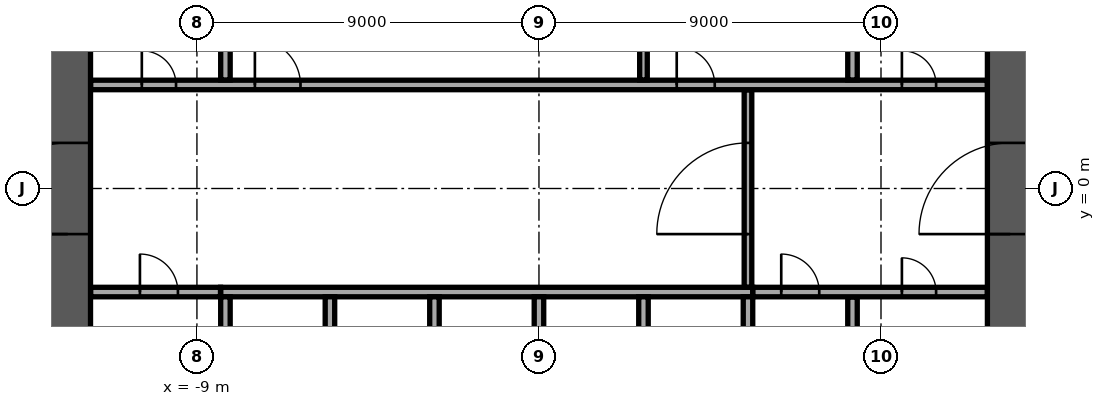
"""IFC4 building model, lengths in metres.
Left out: names, types, materials, properties, quantities, classifications, styles, units other than length and angle.
Written with IfcOpenShell. Run it as: python <this file> out.ifc"""

import sys

from ifc_helpers import new_model, si_unit, direction, frame, frame_2d, origin, place, context, subcontext, project, spatial, rectangle, extrude, element, fill, save


model = new_model("IFC4")
c1 = context("Model", 3, precision=1e-05, world=origin(), true_north=direction((0.0, 1.0)))
c2 = subcontext(c1, "Body", "Model", "MODEL_VIEW")
j1 = project(units=[si_unit("LENGTHUNIT", "METRE"), si_unit("PLANEANGLEUNIT", "RADIAN")], contexts=[c1])
p1 = place(None, origin())
s1 = spatial("IfcSite", under=j1, at=p1, CompositionType="ELEMENT")
p2 = place(p1, origin())
s2 = spatial("IfcBuilding", under=s1, at=p2, CompositionType="ELEMENT")
p3 = place(p2, frame((0.0, 0.0, 18.0)))
s3 = spatial("IfcBuildingStorey", under=s2, at=p3, CompositionType="ELEMENT", Elevation=18.0)
p4 = place(p3, frame((12.4, -11.8, 0.0), z_axis=(0.0, 0.0, 1.0), x_axis=(0.0, 1.0, 0.0)))
e1 = element("IfcWall", 1, at=p4, inside=s3, PredefinedType="SHEAR", context=c2, shape_type="SweptSolid", body=[
    extrude(rectangle(XDim=23.6, YDim=1.2, at=frame_2d((11.8, 0.0))), origin(), (0.0, 0.0, 1.0), 4.05),
])
p5 = place(p4, frame((10.6, 0.0, 0.0)))
e2 = element("IfcOpeningElement", 2, at=p5, cuts=e1, PredefinedType="OPENING", context=c2, shape_type="SweptSolid", body=[
    extrude(rectangle(XDim=2.4, YDim=2.4, at=frame_2d((1.2, 1.2))), frame((0.0, 0.61, 0.0), z_axis=(0.0, -1.0, 0.0), x_axis=(1.0, 0.0, 0.0)), (0.0, 0.0, 1.0), 1.22),
])
p6 = place(p3, frame((-12.4, -11.8, 0.0), z_axis=(0.0, 0.0, 1.0), x_axis=(0.0, 1.0, 0.0)))
e3 = element("IfcWall", 3, at=p6, inside=s3, PredefinedType="SHEAR", context=c2, shape_type="SweptSolid", body=[
    extrude(rectangle(XDim=23.6, YDim=1.2, at=frame_2d((11.8, 0.0))), origin(), (0.0, 0.0, 1.0), 4.05),
])
p7 = place(p6, frame((10.6, 0.0, 0.0)))
e4 = element("IfcOpeningElement", 4, at=p7, cuts=e3, PredefinedType="OPENING", context=c2, shape_type="SweptSolid", body=[
    extrude(rectangle(XDim=2.4, YDim=2.4, at=frame_2d((1.2, 1.2))), frame((0.0, 0.61, 0.0), z_axis=(0.0, -1.0, 0.0), x_axis=(1.0, 0.0, 0.0)), (0.0, 0.0, 1.0), 1.22),
])
p8 = place(p3, frame((-8.375, -2.725, 0.0), z_axis=(0.0, 0.0, 1.0), x_axis=(1.0, 0.0, 0.0)))
e5 = element("IfcWall", 5, at=p8, inside=s3, PredefinedType="SOLIDWALL", context=c2, shape_type="SweptSolid", body=[
    extrude(rectangle(XDim=14.0, YDim=0.25, at=frame_2d((7.0, 0.0))), origin(), (0.0, 0.0, 1.0), 4.05),
])
for number, where, z_axis, x_axis in (
    (6, (-8.25, -5.55, 0.0), (0.0, 0.0, 1.0), (0.0, 1.0, 0.0)),
    (7, (-5.5, -5.55, 0.0), (0.0, 0.0, 1.0), (0.0, 1.0, 0.0)),
    (8, (-2.75, -5.55, 0.0), (0.0, 0.0, 1.0), (0.0, 1.0, 0.0)),
    (9, (0.0, -5.55, 0.0), (0.0, 0.0, 1.0), (0.0, 1.0, 0.0)),
    (10, (2.75, -5.55, 0.0), (0.0, 0.0, 1.0), (0.0, 1.0, 0.0)),
    (11, (5.5, -5.55, 0.0), (0.0, 0.0, 1.0), (0.0, 1.0, 0.0)),
):
    element("IfcWall", number, at=place(p3, frame(where, z_axis=z_axis, x_axis=x_axis)), inside=s3, PredefinedType="SOLIDWALL", context=c2, shape_type="SweptSolid", body=[
        extrude(rectangle(XDim=2.7, YDim=0.25, at=frame_2d((1.35, 0.0))), origin(), (0.0, 0.0, 1.0), 4.05),
    ])
p9 = place(p3, frame((8.25, -5.545, 0.0), z_axis=(0.0, 0.0, 1.0), x_axis=(0.0, 1.0, 0.0)))
e12 = element("IfcWall", 12, at=p9, inside=s3, PredefinedType="PARTITIONING", context=c2, shape_type="SweptSolid", body=[
    extrude(rectangle(XDim=2.69, YDim=0.25, at=frame_2d((1.345, 0.0))), origin(), (0.0, 0.0, 1.0), 4.05),
])
p10 = place(p3, frame((-11.795, -2.725, 0.0), z_axis=(0.0, 0.0, 1.0), x_axis=(1.0, 0.0, 0.0)))
e13 = element("IfcWall", 13, at=p10, inside=s3, PredefinedType="PARTITIONING", context=c2, shape_type="SweptSolid", body=[
    extrude(rectangle(XDim=3.415, YDim=0.25, at=frame_2d((1.708, 0.0))), origin(), (0.0, 0.0, 1.0), 4.05),
])
p11 = place(p10, frame((1.295, 0.0, 0.0)))
e14 = element("IfcOpeningElement", 14, at=p11, cuts=e13, PredefinedType="OPENING", context=c2, shape_type="SweptSolid", body=[
    extrude(rectangle(XDim=1.0, YDim=2.1, at=frame_2d((0.5, 1.05))), frame((0.0, 0.135, 0.0), z_axis=(0.0, -1.0, 0.0), x_axis=(1.0, 0.0, 0.0)), (0.0, 0.0, 1.0), 0.27),
])
p12 = place(p3, frame((5.63, -2.725, 0.0), z_axis=(0.0, 0.0, 1.0), x_axis=(1.0, 0.0, 0.0)))
e15 = element("IfcWall", 15, at=p12, inside=s3, PredefinedType="PARTITIONING", context=c2, shape_type="SweptSolid", body=[
    extrude(rectangle(XDim=6.165, YDim=0.25, at=frame_2d((3.083, 0.0))), origin(), (0.0, 0.0, 1.0), 4.05),
])
p13 = place(p12, frame((0.745, 0.0, 0.0)))
e16 = element("IfcOpeningElement", 16, at=p13, cuts=e15, PredefinedType="OPENING", context=c2, shape_type="SweptSolid", body=[
    extrude(rectangle(XDim=1.0, YDim=2.1, at=frame_2d((0.5, 1.05))), frame((0.0, 0.135, 0.0), z_axis=(0.0, -1.0, 0.0), x_axis=(1.0, 0.0, 0.0)), (0.0, 0.0, 1.0), 0.27),
])
p14 = place(p12, frame((3.92, 0.0, 0.0)))
e17 = element("IfcOpeningElement", 17, at=p14, cuts=e15, PredefinedType="OPENING", context=c2, shape_type="SweptSolid", body=[
    extrude(rectangle(XDim=0.9, YDim=2.1, at=frame_2d((0.45, 1.05))), frame((0.0, 0.135, 0.0), z_axis=(0.0, -1.0, 0.0), x_axis=(1.0, 0.0, 0.0)), (0.0, 0.0, 1.0), 0.27),
])
p15 = place(p3, frame((5.5, -2.595, 0.0), z_axis=(0.0, 0.0, 1.0), x_axis=(0.0, 1.0, 0.0)))
e18 = element("IfcWall", 18, at=p15, inside=s3, PredefinedType="PARTITIONING", context=c2, shape_type="SweptSolid", body=[
    extrude(rectangle(XDim=5.19, YDim=0.2, at=frame_2d((2.595, 0.0))), origin(), (0.0, 0.0, 1.0), 4.05),
])
p16 = place(p15, frame((1.395, 0.0, 0.0)))
e19 = element("IfcOpeningElement", 19, at=p16, cuts=e18, PredefinedType="OPENING", context=c2, shape_type="SweptSolid", body=[
    extrude(rectangle(XDim=2.4, YDim=2.4, at=frame_2d((1.2, 1.2))), frame((0.0, 0.11, 0.0), z_axis=(0.0, -1.0, 0.0), x_axis=(1.0, 0.0, 0.0)), (0.0, 0.0, 1.0), 0.22),
])
p17 = place(p3, frame((-11.795, 2.725, 0.0), z_axis=(0.0, 0.0, 1.0), x_axis=(1.0, 0.0, 0.0)))
e20 = element("IfcWall", 20, at=p17, inside=s3, PredefinedType="PARTITIONING", context=c2, shape_type="SweptSolid", body=[
    extrude(rectangle(XDim=23.59, YDim=0.25, at=frame_2d((11.795, 0.0))), origin(), (0.0, 0.0, 1.0), 4.05),
])
p18 = place(p17, frame((21.345, 0.0, 0.0)))
e21 = element("IfcOpeningElement", 21, at=p18, cuts=e20, PredefinedType="OPENING", context=c2, shape_type="SweptSolid", body=[
    extrude(rectangle(XDim=0.9, YDim=2.1, at=frame_2d((0.45, 1.05))), frame((0.0, 0.135, 0.0), z_axis=(0.0, -1.0, 0.0), x_axis=(1.0, 0.0, 0.0)), (0.0, 0.0, 1.0), 0.27),
])
p19 = place(p17, frame((1.345, 0.0, 0.0)))
e22 = element("IfcOpeningElement", 22, at=p19, cuts=e20, PredefinedType="OPENING", context=c2, shape_type="SweptSolid", body=[
    extrude(rectangle(XDim=0.9, YDim=2.1, at=frame_2d((0.45, 1.05))), frame((0.0, 0.135, 0.0), z_axis=(0.0, -1.0, 0.0), x_axis=(1.0, 0.0, 0.0)), (0.0, 0.0, 1.0), 0.27),
])
p20 = place(p17, frame((4.32, 0.0, 0.0)))
e23 = element("IfcOpeningElement", 23, at=p20, cuts=e20, PredefinedType="OPENING", context=c2, shape_type="SweptSolid", body=[
    extrude(rectangle(XDim=1.2, YDim=2.1, at=frame_2d((0.6, 1.05))), frame((0.0, 0.135, 0.0), z_axis=(0.0, -1.0, 0.0), x_axis=(1.0, 0.0, 0.0)), (0.0, 0.0, 1.0), 0.27),
])
p21 = place(p17, frame((15.42, 0.0, 0.0)))
e24 = element("IfcOpeningElement", 24, at=p21, cuts=e20, PredefinedType="OPENING", context=c2, shape_type="SweptSolid", body=[
    extrude(rectangle(XDim=1.0, YDim=2.1, at=frame_2d((0.5, 1.05))), frame((0.0, 0.135, 0.0), z_axis=(0.0, -1.0, 0.0), x_axis=(1.0, 0.0, 0.0)), (0.0, 0.0, 1.0), 0.27),
])
p22 = place(p3, frame((-8.25, 2.855, 0.0), z_axis=(0.0, 0.0, 1.0), x_axis=(0.0, 1.0, 0.0)))
e25 = element("IfcWall", 25, at=p22, inside=s3, PredefinedType="PARTITIONING", context=c2, shape_type="SweptSolid", body=[
    extrude(rectangle(XDim=1.715, YDim=0.25, at=frame_2d((0.857, 0.0))), origin(), (0.0, 0.0, 1.0), 4.05),
])
p23 = place(p3, frame((2.75, 2.855, 0.0), z_axis=(0.0, 0.0, 1.0), x_axis=(0.0, 1.0, 0.0)))
e26 = element("IfcWall", 26, at=p23, inside=s3, PredefinedType="PARTITIONING", context=c2, shape_type="SweptSolid", body=[
    extrude(rectangle(XDim=2.69, YDim=0.2, at=frame_2d((1.345, 0.0))), origin(), (0.0, 0.0, 1.0), 4.05),
])
p24 = place(p3, frame((8.25, 2.855, 0.0), z_axis=(0.0, 0.0, 1.0), x_axis=(0.0, 1.0, 0.0)))
e27 = element("IfcWall", 27, at=p24, inside=s3, PredefinedType="PARTITIONING", context=c2, shape_type="SweptSolid", body=[
    extrude(rectangle(XDim=2.69, YDim=0.25, at=frame_2d((1.345, 0.0))), origin(), (0.0, 0.0, 1.0), 4.05),
])
p25 = place(p5, origin())
e28 = element("IfcDoor", 28, at=p25, inside=s3, OperationType="SINGLE_SWING_LEFT", PredefinedType="DOOR", context=c2, shape_type="SweptSolid", body=[
    extrude(rectangle(XDim=2.4, YDim=2.4, at=frame_2d((1.2, 1.2))), frame((0.0, 0.025, 0.0), z_axis=(0.0, -1.0, 0.0), x_axis=(1.0, 0.0, 0.0)), (0.0, 0.0, 1.0), 0.05),
])
fill(e2, e28)
p26 = place(p7, origin())
e29 = element("IfcDoor", 29, at=p26, inside=s3, OperationType="SINGLE_SWING_LEFT", PredefinedType="DOOR", context=c2, shape_type="SweptSolid", body=[
    extrude(rectangle(XDim=2.4, YDim=2.4, at=frame_2d((1.2, 1.2))), frame((0.0, 0.025, 0.0), z_axis=(0.0, -1.0, 0.0), x_axis=(1.0, 0.0, 0.0)), (0.0, 0.0, 1.0), 0.05),
])
fill(e4, e29)
p27 = place(p11, origin())
e30 = element("IfcDoor", 30, at=p27, inside=s3, OperationType="SINGLE_SWING_LEFT", PredefinedType="DOOR", context=c2, shape_type="SweptSolid", body=[
    extrude(rectangle(XDim=1.0, YDim=2.1, at=frame_2d((0.5, 1.05))), frame((0.0, 0.025, 0.0), z_axis=(0.0, -1.0, 0.0), x_axis=(1.0, 0.0, 0.0)), (0.0, 0.0, 1.0), 0.05),
])
fill(e14, e30)
p28 = place(p13, origin())
e31 = element("IfcDoor", 31, at=p28, inside=s3, OperationType="SINGLE_SWING_LEFT", PredefinedType="DOOR", context=c2, shape_type="SweptSolid", body=[
    extrude(rectangle(XDim=1.0, YDim=2.1, at=frame_2d((0.5, 1.05))), frame((0.0, 0.025, 0.0), z_axis=(0.0, -1.0, 0.0), x_axis=(1.0, 0.0, 0.0)), (0.0, 0.0, 1.0), 0.05),
])
fill(e16, e31)
p29 = place(p18, origin())
e32 = element("IfcDoor", 32, at=p29, inside=s3, OperationType="SINGLE_SWING_LEFT", PredefinedType="DOOR", context=c2, shape_type="SweptSolid", body=[
    extrude(rectangle(XDim=0.9, YDim=2.1, at=frame_2d((0.45, 1.05))), frame((0.0, 0.025, 0.0), z_axis=(0.0, -1.0, 0.0), x_axis=(1.0, 0.0, 0.0)), (0.0, 0.0, 1.0), 0.05),
])
fill(e21, e32)
p30 = place(p14, origin())
e33 = element("IfcDoor", 33, at=p30, inside=s3, OperationType="SINGLE_SWING_LEFT", PredefinedType="DOOR", context=c2, shape_type="SweptSolid", body=[
    extrude(rectangle(XDim=0.9, YDim=2.1, at=frame_2d((0.45, 1.05))), frame((0.0, 0.025, 0.0), z_axis=(0.0, -1.0, 0.0), x_axis=(1.0, 0.0, 0.0)), (0.0, 0.0, 1.0), 0.05),
])
fill(e17, e33)
p31 = place(p19, origin())
e34 = element("IfcDoor", 34, at=p31, inside=s3, OperationType="SINGLE_SWING_LEFT", PredefinedType="DOOR", context=c2, shape_type="SweptSolid", body=[
    extrude(rectangle(XDim=0.9, YDim=2.1, at=frame_2d((0.45, 1.05))), frame((0.0, 0.025, 0.0), z_axis=(0.0, -1.0, 0.0), x_axis=(1.0, 0.0, 0.0)), (0.0, 0.0, 1.0), 0.05),
])
fill(e22, e34)
p32 = place(p20, origin())
e35 = element("IfcDoor", 35, at=p32, inside=s3, OperationType="SINGLE_SWING_LEFT", PredefinedType="DOOR", context=c2, shape_type="SweptSolid", body=[
    extrude(rectangle(XDim=1.2, YDim=2.1, at=frame_2d((0.6, 1.05))), frame((0.0, 0.025, 0.0), z_axis=(0.0, -1.0, 0.0), x_axis=(1.0, 0.0, 0.0)), (0.0, 0.0, 1.0), 0.05),
])
fill(e23, e35)
p33 = place(p21, origin())
e36 = element("IfcDoor", 36, at=p33, inside=s3, OperationType="SINGLE_SWING_LEFT", PredefinedType="DOOR", context=c2, shape_type="SweptSolid", body=[
    extrude(rectangle(XDim=1.0, YDim=2.1, at=frame_2d((0.5, 1.05))), frame((0.0, 0.025, 0.0), z_axis=(0.0, -1.0, 0.0), x_axis=(1.0, 0.0, 0.0)), (0.0, 0.0, 1.0), 0.05),
])
fill(e24, e36)
p34 = place(p16, origin())
e37 = element("IfcDoor", 37, at=p34, inside=s3, OperationType="SINGLE_SWING_LEFT", PredefinedType="DOOR", context=c2, shape_type="SweptSolid", body=[
    extrude(rectangle(XDim=2.4, YDim=2.4, at=frame_2d((1.2, 1.2))), frame((0.0, 0.025, 0.0), z_axis=(0.0, -1.0, 0.0), x_axis=(1.0, 0.0, 0.0)), (0.0, 0.0, 1.0), 0.05),
])
fill(e19, e37)
save(model, sys.argv[1])
